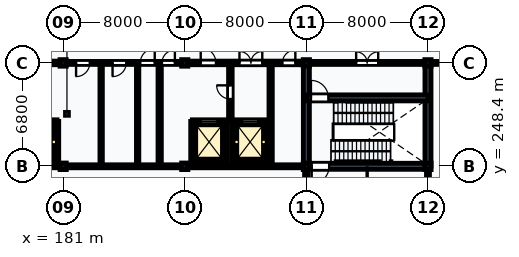
"""IFC4 building model, lengths in metres.
Left out: names, types, materials, properties, quantities, classifications, styles, units other than length and angle.
Written with IfcOpenShell. Run it as: python <this file> out.ifc"""

import sys

from ifc_helpers import new_model, si_unit, direction, frame, frame_2d, origin, origin_2d, place, context, subcontext, project, spatial, rectangle, i_section, extrude, element, fill, save


model = new_model("IFC4")
c1 = context("Model", 3, precision=1e-05, world=origin(), true_north=direction((0.0, 1.0)))
c2 = subcontext(c1, "Body", "Model", "MODEL_VIEW")
j1 = project(units=[si_unit("LENGTHUNIT", "METRE"), si_unit("PLANEANGLEUNIT", "RADIAN")], contexts=[c1])
p1 = place(None, origin())
s1 = spatial("IfcSite", under=j1, at=p1, CompositionType="ELEMENT")
p2 = place(p1, origin())
s2 = spatial("IfcBuilding", under=s1, at=p2, CompositionType="ELEMENT")
p3 = place(p2, origin())
s3 = spatial("IfcBuildingStorey", under=s2, at=p3, CompositionType="ELEMENT", Elevation=0.0)
for number, where, z_axis, x_axis in (
    (1, (181.0, 248.4, 0.0), (0.0, 0.0, 1.0), (1.0, 0.0, 0.0)),
    (2, (181.0, 255.2, 0.0), (0.0, 0.0, 1.0), (1.0, 0.0, 0.0)),
    (3, (189.0, 248.4, 0.0), (0.0, 0.0, 1.0), (1.0, 0.0, 0.0)),
    (4, (189.0, 255.2, 0.0), (0.0, 0.0, 1.0), (1.0, 0.0, 0.0)),
    (5, (197.0, 248.4, 0.0), (0.0, 0.0, 1.0), (1.0, 0.0, 0.0)),
    (6, (197.0, 255.2, 0.0), (0.0, 0.0, 1.0), (1.0, 0.0, 0.0)),
    (7, (205.0, 248.4, 0.0), (0.0, 0.0, 1.0), (1.0, 0.0, 0.0)),
    (8, (205.0, 255.2, 0.0), (0.0, 0.0, 1.0), (1.0, 0.0, 0.0)),
):
    element("IfcColumn", number, at=place(p3, frame(where, z_axis=z_axis, x_axis=x_axis)), inside=s3, PredefinedType="COLUMN", context=c2, shape_type="SweptSolid", body=[
        extrude(i_section(OverallWidth=0.412, OverallDepth=0.435, WebThickness=0.036, FlangeThickness=0.057, FilletRadius=0.015, at=origin_2d()), origin(), (0.0, 0.0, 1.0), 5.4),
    ])
p4 = place(p3, frame((197.0, 248.4, 0.0), z_axis=(0.0, 0.0, 1.0), x_axis=(1.0, 0.0, 0.0)))
e9 = element("IfcWall", 9, at=p4, inside=s3, PredefinedType="SHEAR", context=c2, shape_type="SweptSolid", body=[
    extrude(rectangle(XDim=8.0, YDim=0.4, at=frame_2d((4.0, 0.0))), origin(), (0.0, 0.0, 1.0), 5.14),
])
p5 = place(p4, frame((0.35, 0.0, 0.0)))
e10 = element("IfcOpeningElement", 10, at=p5, cuts=e9, PredefinedType="OPENING", context=c2, shape_type="SweptSolid", body=[
    extrude(rectangle(XDim=1.15, YDim=2.15, at=frame_2d((0.575, 1.075))), frame((0.0, 0.215, 0.0), z_axis=(0.0, -1.0, 0.0), x_axis=(1.0, 0.0, 0.0)), (0.0, 0.0, 1.0), 0.43),
])
for number, where, z_axis, x_axis in (
    (11, (197.0, 248.4, 0.0), (0.0, 0.0, 1.0), (0.0, 1.0, 0.0)),
    (12, (205.0, 248.4, 0.0), (0.0, 0.0, 1.0), (0.0, 1.0, 0.0)),
):
    element("IfcWall", number, at=place(p3, frame(where, z_axis=z_axis, x_axis=x_axis)), inside=s3, PredefinedType="SHEAR", context=c2, shape_type="SweptSolid", body=[
        extrude(rectangle(XDim=6.8, YDim=0.4, at=frame_2d((3.4, 0.0))), origin(), (0.0, 0.0, 1.0), 5.14),
    ])
p6 = place(p3, frame((197.0, 252.9, 0.0), z_axis=(0.0, 0.0, 1.0), x_axis=(1.0, 0.0, 0.0)))
e13 = element("IfcWall", 13, at=p6, inside=s3, PredefinedType="SHEAR", context=c2, shape_type="SweptSolid", body=[
    extrude(rectangle(XDim=8.0, YDim=0.4, at=frame_2d((4.0, 0.0))), origin(), (0.0, 0.0, 1.0), 5.14),
])
p7 = place(p6, frame((0.3, 0.0, 0.0)))
e14 = element("IfcOpeningElement", 14, at=p7, cuts=e13, PredefinedType="OPENING", context=c2, shape_type="SweptSolid", body=[
    extrude(rectangle(XDim=1.15, YDim=2.15, at=frame_2d((0.575, 1.075))), frame((0.0, 0.215, 0.0), z_axis=(0.0, -1.0, 0.0), x_axis=(1.0, 0.0, 0.0)), (0.0, 0.0, 1.0), 0.43),
])
p8 = place(p3, frame((197.0, 255.2, 0.0), z_axis=(0.0, 0.0, 1.0), x_axis=(1.0, 0.0, 0.0)))
e15 = element("IfcWall", 15, at=p8, inside=s3, PredefinedType="PARTITIONING", context=c2, shape_type="SweptSolid", body=[
    extrude(rectangle(XDim=8.0, YDim=0.2, at=frame_2d((4.0, 0.0))), origin(), (0.0, 0.0, 1.0), 4.638),
])
p9 = place(p8, frame((3.275, 0.0, 0.0)))
e16 = element("IfcOpeningElement", 16, at=p9, cuts=e15, PredefinedType="OPENING", context=c2, shape_type="SweptSolid", body=[
    extrude(rectangle(XDim=1.45, YDim=2.2, at=frame_2d((0.725, 1.1))), frame((0.0, 0.115, 0.0), z_axis=(0.0, -1.0, 0.0), x_axis=(1.0, 0.0, 0.0)), (0.0, 0.0, 1.0), 0.23),
])
p10 = place(p3, frame((178.4, 248.65, 0.0), z_axis=(0.0, 0.0, 1.0), x_axis=(1.0, 0.0, 0.0)))
e17 = element("IfcWall", 17, at=p10, inside=s3, PredefinedType="SHEAR", context=c2, shape_type="SweptSolid", body=[
    extrude(rectangle(XDim=2.2, YDim=0.22, at=frame_2d((1.1, 0.0))), origin(), (0.0, 0.0, 1.0), 5.14),
])
p11 = place(p3, frame((180.6, 248.65, 0.0), z_axis=(0.0, 0.0, 1.0), x_axis=(0.0, 1.0, 0.0)))
e18 = element("IfcWall", 18, at=p11, inside=s3, PredefinedType="SHEAR", context=c2, shape_type="SweptSolid", body=[
    extrude(rectangle(XDim=2.7, YDim=0.22, at=frame_2d((1.35, 0.0))), origin(), (0.0, 0.0, 1.0), 5.14),
])
p12 = place(p3, frame((178.4, 251.35, 0.0), z_axis=(0.0, 0.0, 1.0), x_axis=(1.0, 0.0, 0.0)))
e19 = element("IfcWall", 19, at=p12, inside=s3, PredefinedType="SHEAR", context=c2, shape_type="SweptSolid", body=[
    extrude(rectangle(XDim=2.2, YDim=0.22, at=frame_2d((1.1, 0.0))), origin(), (0.0, 0.0, 1.0), 5.14),
])
p13 = place(p12, frame((0.575, 0.0, 0.0)))
e20 = element("IfcOpeningElement", 20, at=p13, cuts=e19, PredefinedType="OPENING", context=c2, shape_type="SweptSolid", body=[
    extrude(rectangle(XDim=1.05, YDim=2.15, at=frame_2d((0.525, 1.075))), frame((0.0, 0.125, 0.0), z_axis=(0.0, -1.0, 0.0), x_axis=(1.0, 0.0, 0.0)), (0.0, 0.0, 1.0), 0.25),
])
p14 = place(p3, frame((189.5, 248.65, 0.0), z_axis=(0.0, 0.0, 1.0), x_axis=(1.0, 0.0, 0.0)))
e21 = element("IfcWall", 21, at=p14, inside=s3, PredefinedType="SHEAR", context=c2, shape_type="SweptSolid", body=[
    extrude(rectangle(XDim=2.2, YDim=0.22, at=frame_2d((1.1, 0.0))), origin(), (0.0, 0.0, 1.0), 5.14),
])
for number, where, z_axis, x_axis in (
    (22, (189.5, 248.65, 0.0), (0.0, 0.0, 1.0), (0.0, 1.0, 0.0)),
    (23, (191.7, 248.65, 0.0), (0.0, 0.0, 1.0), (0.0, 1.0, 0.0)),
):
    element("IfcWall", number, at=place(p3, frame(where, z_axis=z_axis, x_axis=x_axis)), inside=s3, PredefinedType="SHEAR", context=c2, shape_type="SweptSolid", body=[
        extrude(rectangle(XDim=2.7, YDim=0.22, at=frame_2d((1.35, 0.0))), origin(), (0.0, 0.0, 1.0), 5.14),
    ])
p15 = place(p3, frame((189.5, 251.35, 0.0), z_axis=(0.0, 0.0, 1.0), x_axis=(1.0, 0.0, 0.0)))
e24 = element("IfcWall", 24, at=p15, inside=s3, PredefinedType="SHEAR", context=c2, shape_type="SweptSolid", body=[
    extrude(rectangle(XDim=2.2, YDim=0.22, at=frame_2d((1.1, 0.0))), origin(), (0.0, 0.0, 1.0), 5.14),
])
p16 = place(p15, frame((0.55, 0.0, 0.0)))
e25 = element("IfcOpeningElement", 25, at=p16, cuts=e24, PredefinedType="OPENING", context=c2, shape_type="SweptSolid", body=[
    extrude(rectangle(XDim=1.1, YDim=2.15, at=frame_2d((0.55, 1.075))), frame((0.0, 0.125, 0.0), z_axis=(0.0, -1.0, 0.0), x_axis=(1.0, 0.0, 0.0)), (0.0, 0.0, 1.0), 0.25),
])
p17 = place(p3, frame((192.2, 248.65, 0.0), z_axis=(0.0, 0.0, 1.0), x_axis=(1.0, 0.0, 0.0)))
e26 = element("IfcWall", 26, at=p17, inside=s3, PredefinedType="SHEAR", context=c2, shape_type="SweptSolid", body=[
    extrude(rectangle(XDim=2.2, YDim=0.22, at=frame_2d((1.1, 0.0))), origin(), (0.0, 0.0, 1.0), 5.14),
])
for number, where, z_axis, x_axis in (
    (27, (192.2, 248.65, 0.0), (0.0, 0.0, 1.0), (0.0, 1.0, 0.0)),
    (28, (194.4, 248.65, 0.0), (0.0, 0.0, 1.0), (0.0, 1.0, 0.0)),
):
    element("IfcWall", number, at=place(p3, frame(where, z_axis=z_axis, x_axis=x_axis)), inside=s3, PredefinedType="SHEAR", context=c2, shape_type="SweptSolid", body=[
        extrude(rectangle(XDim=2.7, YDim=0.22, at=frame_2d((1.35, 0.0))), origin(), (0.0, 0.0, 1.0), 5.14),
    ])
p18 = place(p3, frame((192.2, 251.35, 0.0), z_axis=(0.0, 0.0, 1.0), x_axis=(1.0, 0.0, 0.0)))
e29 = element("IfcWall", 29, at=p18, inside=s3, PredefinedType="SHEAR", context=c2, shape_type="SweptSolid", body=[
    extrude(rectangle(XDim=2.2, YDim=0.22, at=frame_2d((1.1, 0.0))), origin(), (0.0, 0.0, 1.0), 5.14),
])
p19 = place(p18, frame((0.575, 0.0, 0.0)))
e30 = element("IfcOpeningElement", 30, at=p19, cuts=e29, PredefinedType="OPENING", context=c2, shape_type="SweptSolid", body=[
    extrude(rectangle(XDim=1.05, YDim=2.15, at=frame_2d((0.525, 1.075))), frame((0.0, 0.125, 0.0), z_axis=(0.0, -1.0, 0.0), x_axis=(1.0, 0.0, 0.0)), (0.0, 0.0, 1.0), 0.25),
])
p20 = place(p3, frame((192.0, 251.35, 0.0), z_axis=(0.0, 0.0, 1.0), x_axis=(0.0, 1.0, 0.0)))
e31 = element("IfcWall", 31, at=p20, inside=s3, PredefinedType="PARTITIONING", context=c2, shape_type="SweptSolid", body=[
    extrude(rectangle(XDim=3.85, YDim=0.24, at=frame_2d((1.925, 0.0))), origin(), (0.0, 0.0, 1.0), 5.14),
])
p21 = place(p20, frame((1.475, 0.0, 0.0)))
e32 = element("IfcOpeningElement", 32, at=p21, cuts=e31, PredefinedType="OPENING", context=c2, shape_type="SweptSolid", body=[
    extrude(rectangle(XDim=0.9, YDim=2.1, at=frame_2d((0.45, 1.05))), frame((0.0, 0.135, 0.0), z_axis=(0.0, -1.0, 0.0), x_axis=(1.0, 0.0, 0.0)), (0.0, 0.0, 1.0), 0.27),
])
p22 = place(p3, frame((194.65, 248.4, 0.0), z_axis=(0.0, 0.0, 1.0), x_axis=(0.0, 1.0, 0.0)))
e33 = element("IfcWall", 33, at=p22, inside=s3, PredefinedType="PARTITIONING", context=c2, shape_type="SweptSolid", body=[
    extrude(rectangle(XDim=6.8, YDim=0.22, at=frame_2d((3.4, 0.0))), origin(), (0.0, 0.0, 1.0), 5.14),
])
for number, where, z_axis, x_axis in (
    (34, (183.5, 248.4, 0.0), (0.0, 0.0, 1.0), (0.0, 1.0, 0.0)),
    (35, (185.9, 248.4, 0.0), (0.0, 0.0, 1.0), (0.0, 1.0, 0.0)),
):
    element("IfcWall", number, at=place(p3, frame(where, z_axis=z_axis, x_axis=x_axis)), inside=s3, PredefinedType="PARTITIONING", context=c2, shape_type="SweptSolid", body=[
        extrude(rectangle(XDim=6.8, YDim=0.16, at=frame_2d((3.4, 0.0))), origin(), (0.0, 0.0, 1.0), 5.14),
    ])
p23 = place(p3, frame((187.35, 248.4, 0.0), z_axis=(0.0, 0.0, 1.0), x_axis=(0.0, 1.0, 0.0)))
e36 = element("IfcWall", 36, at=p23, inside=s3, PredefinedType="PARTITIONING", context=c2, shape_type="SweptSolid", body=[
    extrude(rectangle(XDim=6.8, YDim=0.22, at=frame_2d((3.4, 0.0))), origin(), (0.0, 0.0, 1.0), 5.14),
])
p24 = place(p3, frame((181.0, 248.4, 0.0), z_axis=(0.0, 0.0, 1.0), x_axis=(1.0, 0.0, 0.0)))
e37 = element("IfcWall", 37, at=p24, inside=s3, PredefinedType="PARTITIONING", context=c2, shape_type="SweptSolid", body=[
    extrude(rectangle(XDim=8.0, YDim=0.2, at=frame_2d((4.0, 0.0))), origin(), (0.0, 0.0, 1.0), 4.638),
])
p25 = place(p3, frame((173.0, 255.2, 0.0), z_axis=(0.0, 0.0, 1.0), x_axis=(1.0, 0.0, 0.0)))
e38 = element("IfcWall", 38, at=p25, inside=s3, PredefinedType="PARTITIONING", context=c2, shape_type="SweptSolid", body=[
    extrude(rectangle(XDim=8.0, YDim=0.24, at=frame_2d((4.0, 0.0))), origin(), (0.0, 0.0, 1.0), 4.638),
])
p26 = place(p25, frame((1.05, 0.0, 0.0)))
e39 = element("IfcOpeningElement", 39, at=p26, cuts=e38, PredefinedType="OPENING", context=c2, shape_type="SweptSolid", body=[
    extrude(rectangle(XDim=1.0, YDim=2.1, at=frame_2d((0.5, 1.05))), frame((0.0, 0.135, 0.0), z_axis=(0.0, -1.0, 0.0), x_axis=(1.0, 0.0, 0.0)), (0.0, 0.0, 1.0), 0.27),
])
p27 = place(p25, frame((4.6, 0.0, 0.0)))
e40 = element("IfcOpeningElement", 40, at=p27, cuts=e38, PredefinedType="OPENING", context=c2, shape_type="SweptSolid", body=[
    extrude(rectangle(XDim=1.6, YDim=2.25, at=frame_2d((0.8, 1.125))), frame((0.0, 0.135, 0.0), z_axis=(0.0, -1.0, 0.0), x_axis=(1.0, 0.0, 0.0)), (0.0, 0.0, 1.0), 0.27),
])
p28 = place(p3, frame((181.0, 255.2, 0.0), z_axis=(0.0, 0.0, 1.0), x_axis=(1.0, 0.0, 0.0)))
e41 = element("IfcWall", 41, at=p28, inside=s3, PredefinedType="PARTITIONING", context=c2, shape_type="SweptSolid", body=[
    extrude(rectangle(XDim=8.0, YDim=0.2, at=frame_2d((4.0, 0.0))), origin(), (0.0, 0.0, 1.0), 4.638),
])
p29 = place(p28, frame((0.85, 0.0, 0.0)))
e42 = element("IfcOpeningElement", 42, at=p29, cuts=e41, PredefinedType="OPENING", context=c2, shape_type="SweptSolid", body=[
    extrude(rectangle(XDim=0.9, YDim=2.1, at=frame_2d((0.45, 1.05))), frame((0.0, 0.115, 0.0), z_axis=(0.0, -1.0, 0.0), x_axis=(1.0, 0.0, 0.0)), (0.0, 0.0, 1.0), 0.23),
])
p30 = place(p28, frame((3.25, 0.0, 0.0)))
e43 = element("IfcOpeningElement", 43, at=p30, cuts=e41, PredefinedType="OPENING", context=c2, shape_type="SweptSolid", body=[
    extrude(rectangle(XDim=0.9, YDim=2.1, at=frame_2d((0.45, 1.05))), frame((0.0, 0.115, 0.0), z_axis=(0.0, -1.0, 0.0), x_axis=(1.0, 0.0, 0.0)), (0.0, 0.0, 1.0), 0.23),
])
p31 = place(p28, frame((5.075, 0.0, 0.0)))
e44 = element("IfcOpeningElement", 44, at=p31, cuts=e41, PredefinedType="OPENING", context=c2, shape_type="SweptSolid", body=[
    extrude(rectangle(XDim=0.95, YDim=2.1, at=frame_2d((0.475, 1.05))), frame((0.0, 0.115, 0.0), z_axis=(0.0, -1.0, 0.0), x_axis=(1.0, 0.0, 0.0)), (0.0, 0.0, 1.0), 0.23),
])
p32 = place(p28, frame((6.5, 0.0, 0.0)))
e45 = element("IfcOpeningElement", 45, at=p32, cuts=e41, PredefinedType="OPENING", context=c2, shape_type="SweptSolid", body=[
    extrude(rectangle(XDim=0.85, YDim=2.1, at=frame_2d((0.425, 1.05))), frame((0.0, 0.115, 0.0), z_axis=(0.0, -1.0, 0.0), x_axis=(1.0, 0.0, 0.0)), (0.0, 0.0, 1.0), 0.23),
])
p33 = place(p3, frame((189.0, 255.2, 0.0), z_axis=(0.0, 0.0, 1.0), x_axis=(1.0, 0.0, 0.0)))
e46 = element("IfcWall", 46, at=p33, inside=s3, PredefinedType="PARTITIONING", context=c2, shape_type="SweptSolid", body=[
    extrude(rectangle(XDim=8.0, YDim=0.24, at=frame_2d((4.0, 0.0))), origin(), (0.0, 0.0, 1.0), 4.638),
])
p34 = place(p33, frame((1.05, 0.0, 0.0)))
e47 = element("IfcOpeningElement", 47, at=p34, cuts=e46, PredefinedType="OPENING", context=c2, shape_type="SweptSolid", body=[
    extrude(rectangle(XDim=1.0, YDim=2.1, at=frame_2d((0.5, 1.05))), frame((0.0, 0.135, 0.0), z_axis=(0.0, -1.0, 0.0), x_axis=(1.0, 0.0, 0.0)), (0.0, 0.0, 1.0), 0.27),
])
p35 = place(p33, frame((3.6, 0.0, 0.0)))
e48 = element("IfcOpeningElement", 48, at=p35, cuts=e46, PredefinedType="OPENING", context=c2, shape_type="SweptSolid", body=[
    extrude(rectangle(XDim=1.5, YDim=2.25, at=frame_2d((0.75, 1.125))), frame((0.0, 0.135, 0.0), z_axis=(0.0, -1.0, 0.0), x_axis=(1.0, 0.0, 0.0)), (0.0, 0.0, 1.0), 0.27),
])
p36 = place(p33, frame((6.425, 0.0, 0.0)))
e49 = element("IfcOpeningElement", 49, at=p36, cuts=e46, PredefinedType="OPENING", context=c2, shape_type="SweptSolid", body=[
    extrude(rectangle(XDim=0.85, YDim=2.1, at=frame_2d((0.425, 1.05))), frame((0.0, 0.135, 0.0), z_axis=(0.0, -1.0, 0.0), x_axis=(1.0, 0.0, 0.0)), (0.0, 0.0, 1.0), 0.27),
])
p37 = place(p3, frame((197.0, 240.0, 0.0), z_axis=(0.0, 0.0, 1.0), x_axis=(0.0, 1.0, 0.0)))
e50 = element("IfcWall", 50, at=p37, inside=s3, PredefinedType="PARTITIONING", context=c2, shape_type="SweptSolid", body=[
    extrude(rectangle(XDim=8.4, YDim=0.24, at=frame_2d((4.2, 0.0))), origin(), (0.0, 0.0, 1.0), 4.688),
])
p38 = place(p37, frame((3.45, 0.0, 0.0)))
e51 = element("IfcOpeningElement", 51, at=p38, cuts=e50, PredefinedType="OPENING", context=c2, shape_type="SweptSolid", body=[
    extrude(rectangle(XDim=1.5, YDim=2.1, at=frame_2d((0.75, 1.05))), frame((0.0, 0.135, 0.0), z_axis=(0.0, -1.0, 0.0), x_axis=(1.0, 0.0, 0.0)), (0.0, 0.0, 1.0), 0.27),
])
for number, where, z_axis, x_axis in (
    (52, (173.0, 248.4, 0.0), (0.0, 0.0, 1.0), (1.0, 0.0, 0.0)),
    (53, (189.0, 248.4, 0.0), (0.0, 0.0, 1.0), (1.0, 0.0, 0.0)),
):
    element("IfcWall", number, at=place(p3, frame(where, z_axis=z_axis, x_axis=x_axis)), inside=s3, PredefinedType="PARTITIONING", context=c2, shape_type="SweptSolid", body=[
        extrude(rectangle(XDim=8.0, YDim=0.2, at=frame_2d((4.0, 0.0))), origin(), (0.0, 0.0, 1.0), 4.638),
    ])
p39 = place(p3, frame((205.0, 240.0, 0.0), z_axis=(0.0, 0.0, 1.0), x_axis=(0.0, 1.0, 0.0)))
e54 = element("IfcWall", 54, at=p39, inside=s3, PredefinedType="PARTITIONING", context=c2, shape_type="SweptSolid", body=[
    extrude(rectangle(XDim=8.4, YDim=0.2, at=frame_2d((4.2, 0.0))), origin(), (0.0, 0.0, 1.0), 4.688),
])
p40 = place(p3, frame((205.0, 255.2, 0.0), z_axis=(0.0, 0.0, 1.0), x_axis=(1.0, 0.0, 0.0)))
e55 = element("IfcWall", 55, at=p40, inside=s3, PredefinedType="PARTITIONING", context=c2, shape_type="SweptSolid", body=[
    extrude(rectangle(XDim=24.0, YDim=0.2, at=frame_2d((12.0, 0.0))), origin(), (0.0, 0.0, 1.0), 4.638),
])
p41 = place(p40, frame((5.1, 0.0, 0.0)))
e56 = element("IfcOpeningElement", 56, at=p41, cuts=e55, PredefinedType="OPENING", context=c2, shape_type="SweptSolid", body=[
    extrude(rectangle(XDim=1.8, YDim=2.4, at=frame_2d((0.9, 1.2))), frame((0.0, 0.115, 0.0), z_axis=(0.0, -1.0, 0.0), x_axis=(1.0, 0.0, 0.0)), (0.0, 0.0, 1.0), 0.23),
])
p42 = place(p40, frame((17.2, 0.0, 0.0)))
e57 = element("IfcOpeningElement", 57, at=p42, cuts=e55, PredefinedType="OPENING", context=c2, shape_type="SweptSolid", body=[
    extrude(rectangle(XDim=1.6, YDim=2.25, at=frame_2d((0.8, 1.125))), frame((0.0, 0.115, 0.0), z_axis=(0.0, -1.0, 0.0), x_axis=(1.0, 0.0, 0.0)), (0.0, 0.0, 1.0), 0.23),
])
p43 = place(p7, origin())
e58 = element("IfcDoor", 58, at=p43, inside=s3, OperationType="SINGLE_SWING_LEFT", PredefinedType="DOOR", context=c2, shape_type="SweptSolid", body=[
    extrude(rectangle(XDim=1.15, YDim=2.15, at=frame_2d((0.575, 1.075))), frame((0.0, 0.025, 0.0), z_axis=(0.0, -1.0, 0.0), x_axis=(1.0, 0.0, 0.0)), (0.0, 0.0, 1.0), 0.05),
])
fill(e14, e58)
p44 = place(p5, frame((1.15, 0.0, 0.0), z_axis=(0.0, 0.0, 1.0), x_axis=(-1.0, 0.0, 0.0)))
e59 = element("IfcDoor", 59, at=p44, inside=s3, OperationType="SINGLE_SWING_RIGHT", PredefinedType="DOOR", context=c2, shape_type="SweptSolid", body=[
    extrude(rectangle(XDim=1.15, YDim=2.15, at=frame_2d((0.575, 1.075))), frame((0.0, 0.025, 0.0), z_axis=(0.0, -1.0, 0.0), x_axis=(1.0, 0.0, 0.0)), (0.0, 0.0, 1.0), 0.05),
])
fill(e10, e59)
p45 = place(p9, origin())
e60 = element("IfcDoor", 60, at=p45, inside=s3, OperationType="DOUBLE_DOOR_SINGLE_SWING", PredefinedType="DOOR", context=c2, shape_type="SweptSolid", body=[
    extrude(rectangle(XDim=1.45, YDim=2.2, at=frame_2d((0.725, 1.1))), frame((0.0, 0.025, 0.0), z_axis=(0.0, -1.0, 0.0), x_axis=(1.0, 0.0, 0.0)), (0.0, 0.0, 1.0), 0.05),
])
fill(e16, e60)
p46 = place(p16, origin())
e61 = element("IfcDoor", 61, at=p46, inside=s3, OperationType="DOUBLE_DOOR_SLIDING", PredefinedType="USERDEFINED", context=c2, shape_type="SweptSolid", body=[
    extrude(rectangle(XDim=1.1, YDim=2.15, at=frame_2d((0.55, 1.075))), frame((0.0, 0.025, 0.0), z_axis=(0.0, -1.0, 0.0), x_axis=(1.0, 0.0, 0.0)), (0.0, 0.0, 1.0), 0.05),
])
fill(e25, e61)
p47 = place(p19, origin())
e62 = element("IfcDoor", 62, at=p47, inside=s3, OperationType="DOUBLE_DOOR_SLIDING", PredefinedType="USERDEFINED", context=c2, shape_type="SweptSolid", body=[
    extrude(rectangle(XDim=1.05, YDim=2.15, at=frame_2d((0.525, 1.075))), frame((0.0, 0.025, 0.0), z_axis=(0.0, -1.0, 0.0), x_axis=(1.0, 0.0, 0.0)), (0.0, 0.0, 1.0), 0.05),
])
fill(e30, e62)
p48 = place(p21, frame((0.9, 0.0, 0.0), z_axis=(0.0, 0.0, 1.0), x_axis=(-1.0, 0.0, 0.0)))
e63 = element("IfcDoor", 63, at=p48, inside=s3, OperationType="SINGLE_SWING_LEFT", PredefinedType="DOOR", context=c2, shape_type="SweptSolid", body=[
    extrude(rectangle(XDim=0.9, YDim=2.1, at=frame_2d((0.45, 1.05))), frame((0.0, 0.025, 0.0), z_axis=(0.0, -1.0, 0.0), x_axis=(1.0, 0.0, 0.0)), (0.0, 0.0, 1.0), 0.05),
])
fill(e32, e63)
p49 = place(p29, frame((0.9, 0.0, 0.0), z_axis=(0.0, 0.0, 1.0), x_axis=(-1.0, 0.0, 0.0)))
e64 = element("IfcDoor", 64, at=p49, inside=s3, OperationType="SINGLE_SWING_RIGHT", PredefinedType="DOOR", context=c2, shape_type="SweptSolid", body=[
    extrude(rectangle(XDim=0.9, YDim=2.1, at=frame_2d((0.45, 1.05))), frame((0.0, 0.025, 0.0), z_axis=(0.0, -1.0, 0.0), x_axis=(1.0, 0.0, 0.0)), (0.0, 0.0, 1.0), 0.05),
])
fill(e42, e64)
p50 = place(p30, frame((0.9, 0.0, 0.0), z_axis=(0.0, 0.0, 1.0), x_axis=(-1.0, 0.0, 0.0)))
e65 = element("IfcDoor", 65, at=p50, inside=s3, OperationType="SINGLE_SWING_RIGHT", PredefinedType="DOOR", context=c2, shape_type="SweptSolid", body=[
    extrude(rectangle(XDim=0.9, YDim=2.1, at=frame_2d((0.45, 1.05))), frame((0.0, 0.025, 0.0), z_axis=(0.0, -1.0, 0.0), x_axis=(1.0, 0.0, 0.0)), (0.0, 0.0, 1.0), 0.05),
])
fill(e43, e65)
p51 = place(p31, frame((0.95, 0.0, 0.0), z_axis=(0.0, 0.0, 1.0), x_axis=(-1.0, 0.0, 0.0)))
e66 = element("IfcDoor", 66, at=p51, inside=s3, OperationType="SINGLE_SWING_LEFT", PredefinedType="DOOR", context=c2, shape_type="SweptSolid", body=[
    extrude(rectangle(XDim=0.95, YDim=2.1, at=frame_2d((0.475, 1.05))), frame((0.0, 0.025, 0.0), z_axis=(0.0, -1.0, 0.0), x_axis=(1.0, 0.0, 0.0)), (0.0, 0.0, 1.0), 0.05),
])
fill(e44, e66)
p52 = place(p32, frame((0.85, 0.0, 0.0), z_axis=(0.0, 0.0, 1.0), x_axis=(-1.0, 0.0, 0.0)))
e67 = element("IfcDoor", 67, at=p52, inside=s3, OperationType="SINGLE_SWING_LEFT", PredefinedType="DOOR", context=c2, shape_type="SweptSolid", body=[
    extrude(rectangle(XDim=0.85, YDim=2.1, at=frame_2d((0.425, 1.05))), frame((0.0, 0.025, 0.0), z_axis=(0.0, -1.0, 0.0), x_axis=(1.0, 0.0, 0.0)), (0.0, 0.0, 1.0), 0.05),
])
fill(e45, e67)
p53 = place(p34, origin())
e68 = element("IfcDoor", 68, at=p53, inside=s3, OperationType="SINGLE_SWING_LEFT", PredefinedType="DOOR", context=c2, shape_type="SweptSolid", body=[
    extrude(rectangle(XDim=1.0, YDim=2.1, at=frame_2d((0.5, 1.05))), frame((0.0, 0.025, 0.0), z_axis=(0.0, -1.0, 0.0), x_axis=(1.0, 0.0, 0.0)), (0.0, 0.0, 1.0), 0.05),
])
fill(e47, e68)
p54 = place(p35, origin())
e69 = element("IfcDoor", 69, at=p54, inside=s3, OperationType="DOUBLE_DOOR_SINGLE_SWING", PredefinedType="DOOR", context=c2, shape_type="SweptSolid", body=[
    extrude(rectangle(XDim=1.5, YDim=2.25, at=frame_2d((0.75, 1.125))), frame((0.0, 0.025, 0.0), z_axis=(0.0, -1.0, 0.0), x_axis=(1.0, 0.0, 0.0)), (0.0, 0.0, 1.0), 0.05),
])
fill(e48, e69)
p55 = place(p36, frame((0.85, 0.0, 0.0), z_axis=(0.0, 0.0, 1.0), x_axis=(-1.0, 0.0, 0.0)))
e70 = element("IfcDoor", 70, at=p55, inside=s3, OperationType="SINGLE_SWING_LEFT", PredefinedType="DOOR", context=c2, shape_type="SweptSolid", body=[
    extrude(rectangle(XDim=0.85, YDim=2.1, at=frame_2d((0.425, 1.05))), frame((0.0, 0.025, 0.0), z_axis=(0.0, -1.0, 0.0), x_axis=(1.0, 0.0, 0.0)), (0.0, 0.0, 1.0), 0.05),
])
fill(e49, e70)
save(model, sys.argv[1])
